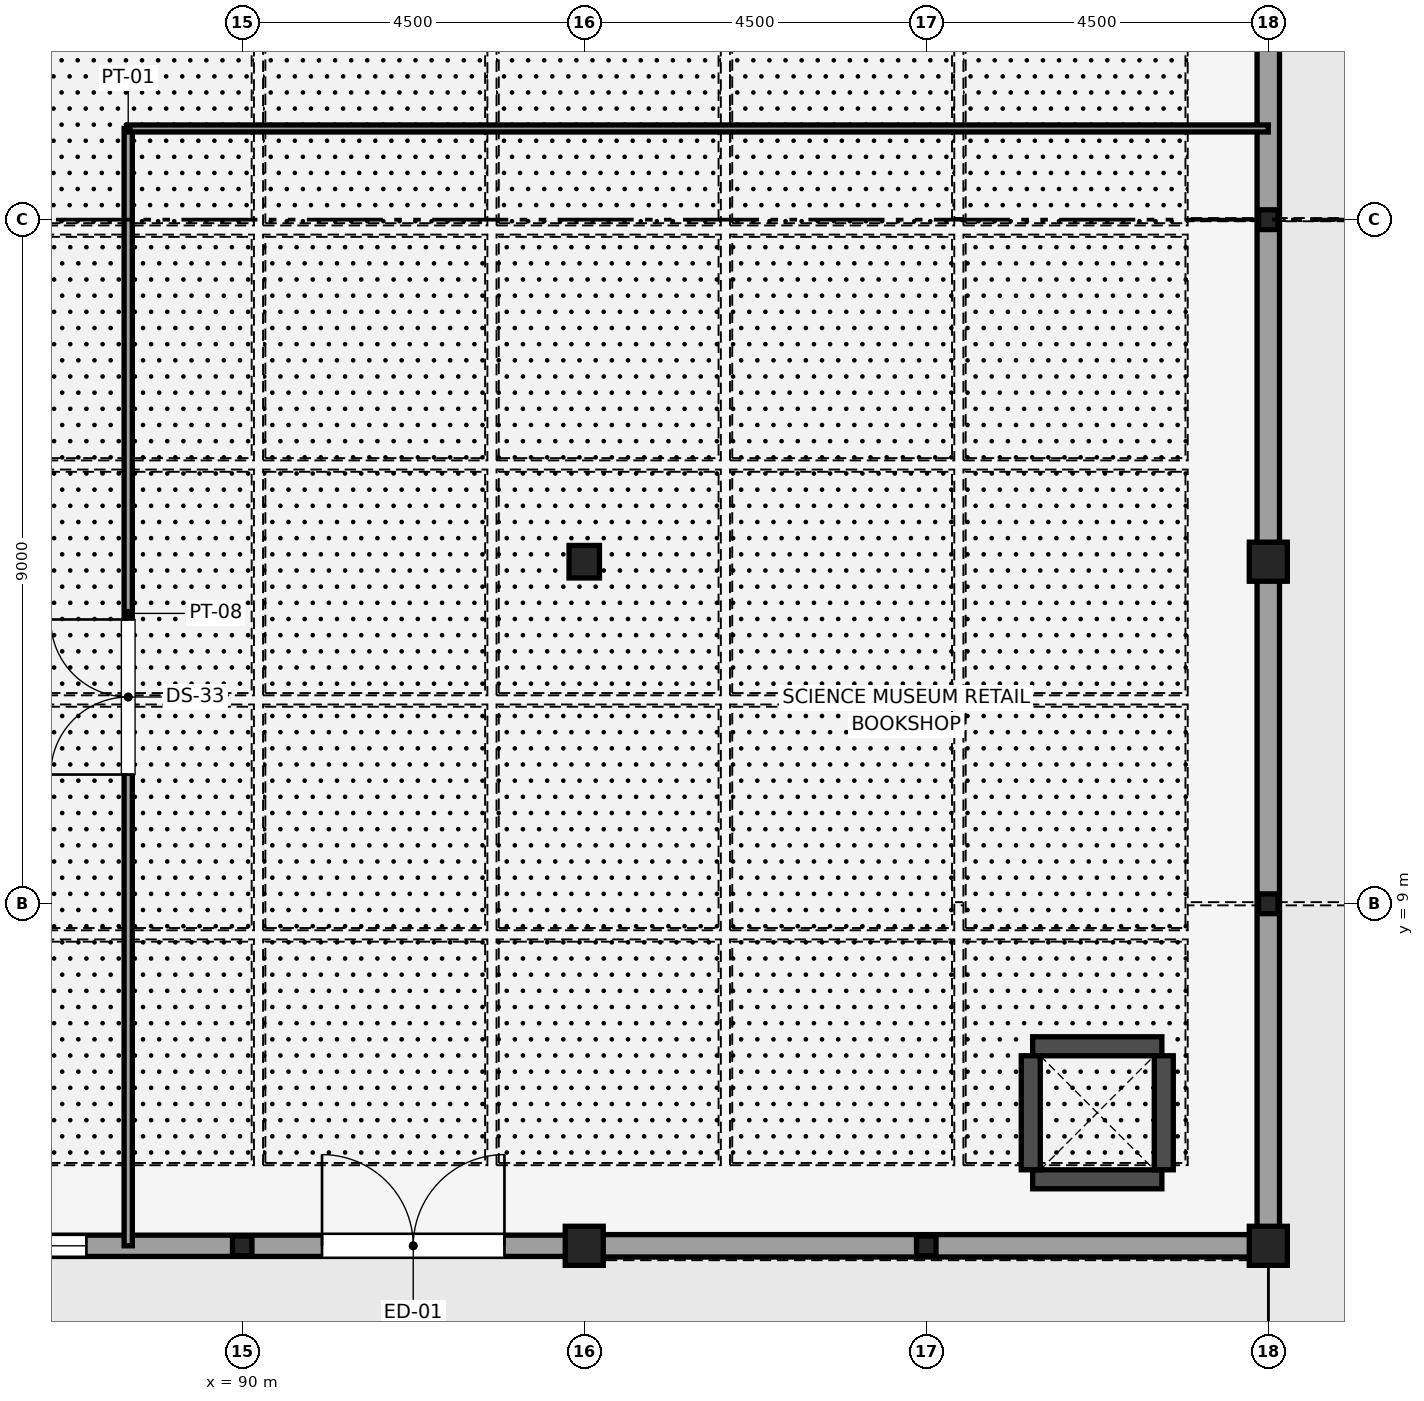
"""IFC4 building model, lengths in metres.
Left out: names, types, materials, properties, quantities, classifications, styles, units other than length and angle.
Written with IfcOpenShell. Run it as: python <this file> out.ifc"""

import sys

from ifc_helpers import new_model, si_unit, direction, frame, frame_2d, origin, origin_2d, place, context, subcontext, project, spatial, rectangle, i_section, extrude, element, fill, save


model = new_model("IFC4")
c1 = context("Model", 3, precision=1e-05, world=origin(), true_north=direction((0.0, 1.0)))
c2 = subcontext(c1, "Body", "Model", "MODEL_VIEW")
j1 = project(units=[si_unit("LENGTHUNIT", "METRE"), si_unit("PLANEANGLEUNIT", "RADIAN")], contexts=[c1])
p1 = place(None, origin())
s1 = spatial("IfcSite", under=j1, at=p1, CompositionType="ELEMENT")
p2 = place(p1, origin())
s2 = spatial("IfcBuilding", under=s1, at=p2, CompositionType="ELEMENT")
p3 = place(p2, origin())
s3 = spatial("IfcBuildingStorey", under=s2, at=p3, CompositionType="ELEMENT", Elevation=0.0)
p4 = place(p3, frame((94.5, 4.5, 0.0), z_axis=(0.0, 0.0, 1.0), x_axis=(1.0, 0.0, 0.0)))
e1 = element("IfcColumn", 1, at=p4, inside=s3, PredefinedType="COLUMN", context=c2, shape_type="SweptSolid", body=[
    extrude(i_section(OverallWidth=0.5, OverallDepth=0.514, WebThickness=0.022, FlangeThickness=0.032, FilletRadius=0.016, at=origin_2d()), origin(), (0.0, 0.0, 1.0), 5.4),
])
p5 = place(p3, frame((94.5, 13.5, 0.0), z_axis=(0.0, 0.0, 1.0), x_axis=(1.0, 0.0, 0.0)))
e2 = element("IfcColumn", 2, at=p5, inside=s3, PredefinedType="COLUMN", context=c2, shape_type="SweptSolid", body=[
    extrude(i_section(OverallWidth=0.4, OverallDepth=0.428, WebThickness=0.02, FlangeThickness=0.028, FilletRadius=0.016, at=origin_2d()), origin(), (0.0, 0.0, 1.0), 5.4),
])
for number, where, z_axis, x_axis in (
    (3, (103.5, 4.5, 0.0), (0.0, 0.0, 1.0), (1.0, 0.0, 0.0)),
    (4, (103.5, 13.5, 0.0), (0.0, 0.0, 1.0), (1.0, 0.0, 0.0)),
):
    element("IfcColumn", number, at=place(p3, frame(where, z_axis=z_axis, x_axis=x_axis)), inside=s3, PredefinedType="COLUMN", context=c2, shape_type="SweptSolid", body=[
        extrude(i_section(OverallWidth=0.5, OverallDepth=0.514, WebThickness=0.022, FlangeThickness=0.032, FilletRadius=0.016, at=origin_2d()), origin(), (0.0, 0.0, 1.0), 5.4),
    ])
for number, where, z_axis, x_axis in (
    (5, (90.0, 4.5, 0.0), (0.0, 0.0, 1.0), (1.0, 0.0, 0.0)),
    (6, (99.0, 4.5, 0.0), (0.0, 0.0, 1.0), (1.0, 0.0, 0.0)),
    (7, (103.5, 9.0, 0.0), (0.0, 0.0, 1.0), (1.0, 0.0, 0.0)),
    (8, (103.5, 18.0, 0.0), (0.0, 0.0, 1.0), (1.0, 0.0, 0.0)),
):
    element("IfcColumn", number, at=place(p3, frame(where, z_axis=z_axis, x_axis=x_axis)), inside=s3, PredefinedType="PILASTER", context=c2, shape_type="SweptSolid", body=[
        extrude(i_section(OverallWidth=0.256, OverallDepth=0.26, WebThickness=0.01, FlangeThickness=0.017, FilletRadius=0.014, at=origin_2d()), origin(), (0.0, 0.0, 1.0), 5.4),
    ])
for number, where, z_axis, x_axis in (
    (9, (100.4, 5.375, 0.0), (0.0, 0.0, 1.0), (1.0, 0.0, 0.0)),
    (10, (100.4, 7.125, 0.0), (0.0, 0.0, 1.0), (1.0, 0.0, 0.0)),
):
    element("IfcWall", number, at=place(p3, frame(where, z_axis=z_axis, x_axis=x_axis)), inside=s3, PredefinedType="SHEAR", context=c2, shape_type="SweptSolid", body=[
        extrude(rectangle(XDim=1.7, YDim=0.25, at=frame_2d((0.85, 0.0))), origin(), (0.0, 0.0, 1.0), 4.67),
    ])
for number, where, z_axis, x_axis in (
    (11, (100.375, 5.5, 0.0), (0.0, 0.0, 1.0), (0.0, 1.0, 0.0)),
    (12, (102.125, 5.5, 0.0), (0.0, 0.0, 1.0), (0.0, 1.0, 0.0)),
):
    element("IfcWall", number, at=place(p3, frame(where, z_axis=z_axis, x_axis=x_axis)), inside=s3, PredefinedType="SHEAR", context=c2, shape_type="SweptSolid", body=[
        extrude(rectangle(XDim=1.5, YDim=0.25, at=frame_2d((0.75, 0.0))), origin(), (0.0, 0.0, 1.0), 4.67),
    ])
p6 = place(p3, frame((85.5, 4.5, 0.0), z_axis=(0.0, 0.0, 1.0), x_axis=(1.0, 0.0, 0.0)))
e13 = element("IfcWall", 13, at=p6, inside=s3, PredefinedType="STANDARD", context=c2, shape_type="SweptSolid", body=[
    extrude(rectangle(XDim=9.0, YDim=0.28, at=frame_2d((4.5, 0.0))), origin(), (0.0, 0.0, 1.0), 4.746),
])
p7 = place(p6, frame((0.65, 0.0, 0.9)))
e14 = element("IfcOpeningElement", 14, at=p7, cuts=e13, PredefinedType="OPENING", context=c2, shape_type="SweptSolid", body=[
    extrude(rectangle(XDim=1.8, YDim=2.4, at=frame_2d((0.9, 1.2))), frame((0.0, 0.15, 0.0), z_axis=(0.0, -1.0, 0.0), x_axis=(1.0, 0.0, 0.0)), (0.0, 0.0, 1.0), 0.3),
])
p8 = place(p6, frame((5.55, 0.0, 0.0)))
e15 = element("IfcOpeningElement", 15, at=p8, cuts=e13, PredefinedType="OPENING", context=c2, shape_type="SweptSolid", body=[
    extrude(rectangle(XDim=2.4, YDim=2.7, at=frame_2d((1.2, 1.35))), frame((0.0, 0.15, 0.0), z_axis=(0.0, -1.0, 0.0), x_axis=(1.0, 0.0, 0.0)), (0.0, 0.0, 1.0), 0.3),
])
for number, where, z_axis, x_axis in (
    (16, (94.5, 4.5, 0.0), (0.0, 0.0, 1.0), (1.0, 0.0, 0.0)),
    (17, (103.5, 4.5, 0.0), (0.0, 0.0, 1.0), (0.0, 1.0, 0.0)),
    (18, (103.5, 13.5, 0.0), (0.0, 0.0, 1.0), (0.0, 1.0, 0.0)),
):
    element("IfcWall", number, at=place(p3, frame(where, z_axis=z_axis, x_axis=x_axis)), inside=s3, PredefinedType="STANDARD", context=c2, shape_type="SweptSolid", body=[
        extrude(rectangle(XDim=9.0, YDim=0.295, at=frame_2d((4.5, 0.0))), origin(), (0.0, 0.0, 1.0), 4.746),
    ])
p9 = place(p3, frame((88.5, 4.5, 0.0), z_axis=(0.0, 0.0, 1.0), x_axis=(0.0, 1.0, 0.0)))
e19 = element("IfcWall", 19, at=p9, inside=s3, PredefinedType="PARTITIONING", context=c2, shape_type="SweptSolid", body=[
    extrude(rectangle(XDim=14.7, YDim=0.108, at=frame_2d((7.35, 0.0))), origin(), (0.0, 0.0, 1.0), 5.22),
])
p10 = place(p9, frame((6.2, 0.0, 0.0)))
e20 = element("IfcOpeningElement", 20, at=p10, cuts=e19, PredefinedType="OPENING", context=c2, shape_type="SweptSolid", body=[
    extrude(rectangle(XDim=2.04, YDim=2.475, at=frame_2d((1.02, 1.238))), frame((0.0, 0.064, 0.0), z_axis=(0.0, -1.0, 0.0), x_axis=(1.0, 0.0, 0.0)), (0.0, 0.0, 1.0), 0.128),
])
p11 = place(p3, frame((88.5, 19.2, 0.0), z_axis=(0.0, 0.0, 1.0), x_axis=(1.0, 0.0, 0.0)))
e21 = element("IfcWall", 21, at=p11, inside=s3, PredefinedType="PARTITIONING", context=c2, shape_type="SweptSolid", body=[
    extrude(rectangle(XDim=15.0, YDim=0.092, at=frame_2d((7.5, 0.0))), origin(), (0.0, 0.0, 1.0), 5.22),
])
p12 = place(p7, origin())
e22 = element("IfcWindow", 22, at=p12, inside=s3, PartitioningType="SINGLE_PANEL", PredefinedType="WINDOW", context=c2, shape_type="SweptSolid", body=[
    extrude(rectangle(XDim=1.8, YDim=2.4, at=frame_2d((0.9, 1.2))), frame((0.0, 0.03, 0.0), z_axis=(0.0, -1.0, 0.0), x_axis=(1.0, 0.0, 0.0)), (0.0, 0.0, 1.0), 0.06),
])
fill(e14, e22)
p13 = place(p8, origin())
e23 = element("IfcDoor", 23, at=p13, inside=s3, OperationType="DOUBLE_DOOR_SINGLE_SWING", PredefinedType="DOOR", context=c2, shape_type="SweptSolid", body=[
    extrude(rectangle(XDim=2.4, YDim=2.7, at=frame_2d((1.2, 1.35))), frame((0.0, 0.025, 0.0), z_axis=(0.0, -1.0, 0.0), x_axis=(1.0, 0.0, 0.0)), (0.0, 0.0, 1.0), 0.05),
])
fill(e15, e23)
p14 = place(p10, origin())
e24 = element("IfcDoor", 24, at=p14, inside=s3, OperationType="DOUBLE_DOOR_DOUBLE_SWING", PredefinedType="DOOR", context=c2, shape_type="SweptSolid", body=[
    extrude(rectangle(XDim=2.04, YDim=2.475, at=frame_2d((1.02, 1.238))), frame((0.0, 0.025, 0.0), z_axis=(0.0, -1.0, 0.0), x_axis=(1.0, 0.0, 0.0)), (0.0, 0.0, 1.0), 0.05),
])
fill(e20, e24)
save(model, sys.argv[1])
